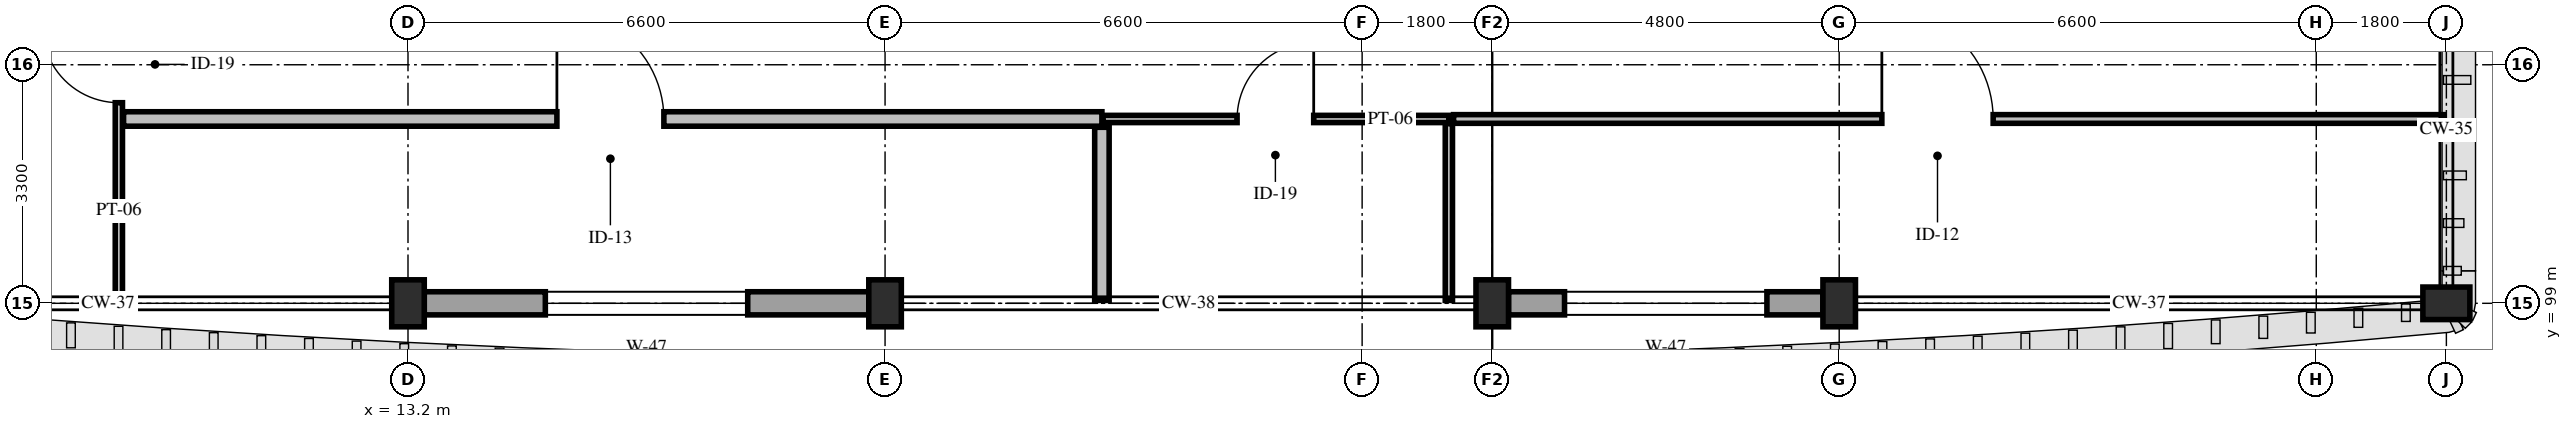
"""IFC4 building model, lengths in metres.
Left out: names, types, materials, properties, quantities, classifications, styles, units other than length and angle.
Written with IfcOpenShell. Run it as: python <this file> out.ifc"""

import sys

from ifc_helpers import new_model, si_unit, direction, frame, frame_2d, origin, origin_2d, place, context, subcontext, project, spatial, rectangle, extrude, element, fill, save


model = new_model("IFC4")
c1 = context("Model", 3, precision=1e-05, world=origin(), true_north=direction((0.0, 1.0)))
c2 = subcontext(c1, "Body", "Model", "MODEL_VIEW")
j1 = project(units=[si_unit("LENGTHUNIT", "METRE"), si_unit("PLANEANGLEUNIT", "RADIAN")], contexts=[c1])
p1 = place(None, origin())
s1 = spatial("IfcSite", under=j1, at=p1, CompositionType="ELEMENT")
p2 = place(p1, origin())
s2 = spatial("IfcBuilding", under=s1, at=p2, CompositionType="ELEMENT")
p3 = place(p2, frame((0.0, 0.0, 42.6)))
s3 = spatial("IfcBuildingStorey", under=s2, at=p3, CompositionType="ELEMENT", Elevation=42.6)
for number, where, z_axis, x_axis in (
    (1, (13.2, 99.0, 0.0), (0.0, 0.0, 1.0), (1.0, 0.0, 0.0)),
    (2, (19.8, 99.0, 0.0), (0.0, 0.0, 1.0), (1.0, 0.0, 0.0)),
    (3, (28.2, 99.0, 0.0), (0.0, 0.0, 1.0), (1.0, 0.0, 0.0)),
    (4, (33.0, 99.0, 0.0), (0.0, 0.0, 1.0), (1.0, 0.0, 0.0)),
    (5, (41.4, 99.0, 0.0), (0.0, 0.0, 1.0), (0.0, 1.0, 0.0)),
):
    element("IfcColumn", number, at=place(p3, frame(where, z_axis=z_axis, x_axis=x_axis)), inside=s3, PredefinedType="PILASTER", context=c2, shape_type="SweptSolid", body=[
        extrude(rectangle(XDim=0.45, YDim=0.65, at=origin_2d()), origin(), (0.0, 0.0, 1.0), 4.2),
    ])
p4 = place(p3, frame((32.775, 99.0, 0.0), z_axis=(0.0, 0.0, 1.0), x_axis=(-1.0, 0.0, 0.0)))
e6 = element("IfcWall", 6, at=p4, inside=s3, PredefinedType="STANDARD", context=c2, shape_type="SweptSolid", body=[
    extrude(rectangle(XDim=4.35, YDim=0.32, at=frame_2d((2.175, 0.0))), origin(), (0.0, 0.0, 1.0), 3.35),
])
p5 = place(p4, frame((0.775, 0.0, 0.85)))
e7 = element("IfcOpeningElement", 7, at=p5, cuts=e6, PredefinedType="OPENING", context=c2, shape_type="SweptSolid", body=[
    extrude(rectangle(XDim=2.8, YDim=2.08, at=frame_2d((1.4, 1.04))), frame((0.0, 0.175, 0.0), z_axis=(0.0, -1.0, 0.0), x_axis=(1.0, 0.0, 0.0)), (0.0, 0.0, 1.0), 0.35),
])
p6 = place(p3, frame((19.575, 99.0, 0.0), z_axis=(0.0, 0.0, 1.0), x_axis=(-1.0, 0.0, 0.0)))
e8 = element("IfcWall", 8, at=p6, inside=s3, PredefinedType="STANDARD", context=c2, shape_type="SweptSolid", body=[
    extrude(rectangle(XDim=6.15, YDim=0.32, at=frame_2d((3.075, 0.0))), origin(), (0.0, 0.0, 1.0), 3.35),
])
p7 = place(p6, frame((1.675, 0.0, 0.85)))
e9 = element("IfcOpeningElement", 9, at=p7, cuts=e8, PredefinedType="OPENING", context=c2, shape_type="SweptSolid", body=[
    extrude(rectangle(XDim=2.8, YDim=2.08, at=frame_2d((1.4, 1.04))), frame((0.0, 0.175, 0.0), z_axis=(0.0, -1.0, 0.0), x_axis=(1.0, 0.0, 0.0)), (0.0, 0.0, 1.0), 0.35),
])
p8 = place(p3, frame((9.2, 99.04, 0.0), z_axis=(0.0, 0.0, 1.0), x_axis=(0.0, 1.0, 0.0)))
e10 = element("IfcWall", 10, at=p8, inside=s3, PredefinedType="PARTITIONING", context=c2, shape_type="SweptSolid", body=[
    extrude(rectangle(XDim=4.045, YDim=0.1, at=frame_2d((2.022, 0.0))), origin(), (0.0, 0.0, 1.0), 3.88),
])
p9 = place(p8, frame((2.735, 0.0, 0.0)))
e11 = element("IfcOpeningElement", 11, at=p9, cuts=e10, PredefinedType="OPENING", context=c2, shape_type="SweptSolid", body=[
    extrude(rectangle(XDim=1.06, YDim=2.2, at=frame_2d((0.53, 1.1))), frame((0.0, 0.065, 0.0), z_axis=(0.0, -1.0, 0.0), x_axis=(1.0, 0.0, 0.0)), (0.0, 0.0, 1.0), 0.13),
])
p10 = place(p3, frame((9.265, 101.55, 0.0), z_axis=(0.0, 0.0, 1.0), x_axis=(1.0, 0.0, 0.0)))
e12 = element("IfcWall", 12, at=p10, inside=s3, PredefinedType="PARTITIONING", context=c2, shape_type="SweptSolid", body=[
    extrude(rectangle(XDim=13.535, YDim=0.2, at=frame_2d((6.768, 0.0))), origin(), (0.0, 0.0, 1.0), 3.88),
])
p11 = place(p10, frame((5.995, 0.0, 0.0)))
e13 = element("IfcOpeningElement", 13, at=p11, cuts=e12, PredefinedType="OPENING", context=c2, shape_type="SweptSolid", body=[
    extrude(rectangle(XDim=1.48, YDim=2.3, at=frame_2d((0.74, 1.15))), frame((0.0, 0.115, 0.0), z_axis=(0.0, -1.0, 0.0), x_axis=(1.0, 0.0, 0.0)), (0.0, 0.0, 1.0), 0.23),
])
p12 = place(p3, frame((22.8, 99.04, 0.0), z_axis=(0.0, 0.0, 1.0), x_axis=(0.0, 1.0, 0.0)))
e14 = element("IfcWall", 14, at=p12, inside=s3, PredefinedType="PARTITIONING", context=c2, shape_type="SweptSolid", body=[
    extrude(rectangle(XDim=2.395, YDim=0.2, at=frame_2d((1.198, 0.0))), origin(), (0.0, 0.0, 1.0), 3.88),
])
p13 = place(p3, frame((22.815, 101.55, 0.0), z_axis=(0.0, 0.0, 1.0), x_axis=(1.0, 0.0, 0.0)))
e15 = element("IfcWall", 15, at=p13, inside=s3, PredefinedType="PARTITIONING", context=c2, shape_type="SweptSolid", body=[
    extrude(rectangle(XDim=4.785, YDim=0.1, at=frame_2d((2.393, 0.0))), origin(), (0.0, 0.0, 1.0), 3.88),
])
p14 = place(p13, frame((1.855, 0.0, 0.0)))
e16 = element("IfcOpeningElement", 16, at=p14, cuts=e15, PredefinedType="OPENING", context=c2, shape_type="SweptSolid", body=[
    extrude(rectangle(XDim=1.06, YDim=2.2, at=frame_2d((0.53, 1.1))), frame((0.0, 0.065, 0.0), z_axis=(0.0, -1.0, 0.0), x_axis=(1.0, 0.0, 0.0)), (0.0, 0.0, 1.0), 0.13),
])
p15 = place(p3, frame((27.6, 99.04, 0.0), z_axis=(0.0, 0.0, 1.0), x_axis=(0.0, 1.0, 0.0)))
e17 = element("IfcWall", 17, at=p15, inside=s3, PredefinedType="PARTITIONING", context=c2, shape_type="SweptSolid", body=[
    extrude(rectangle(XDim=2.445, YDim=0.1, at=frame_2d((1.223, 0.0))), origin(), (0.0, 0.0, 1.0), 3.88),
])
p16 = place(p3, frame((27.665, 101.55, 0.0), z_axis=(0.0, 0.0, 1.0), x_axis=(1.0, 0.0, 0.0)))
e18 = element("IfcWall", 18, at=p16, inside=s3, PredefinedType="PARTITIONING", context=c2, shape_type="SweptSolid", body=[
    extrude(rectangle(XDim=13.695, YDim=0.12, at=frame_2d((6.848, 0.0))), origin(), (0.0, 0.0, 1.0), 3.88),
])
p17 = place(p16, frame((5.925, 0.0, 0.0)))
e19 = element("IfcOpeningElement", 19, at=p17, cuts=e18, PredefinedType="OPENING", context=c2, shape_type="SweptSolid", body=[
    extrude(rectangle(XDim=1.54, YDim=2.25, at=frame_2d((0.77, 1.125))), frame((0.0, 0.075, 0.0), z_axis=(0.0, -1.0, 0.0), x_axis=(1.0, 0.0, 0.0)), (0.0, 0.0, 1.0), 0.15),
])
p18 = place(p5, origin())
e20 = element("IfcWindow", 20, at=p18, inside=s3, PartitioningType="DOUBLE_PANEL_VERTICAL", PredefinedType="WINDOW", context=c2, shape_type="SweptSolid", body=[
    extrude(rectangle(XDim=2.8, YDim=2.08, at=frame_2d((1.4, 1.04))), frame((0.0, 0.03, 0.0), z_axis=(0.0, -1.0, 0.0), x_axis=(1.0, 0.0, 0.0)), (0.0, 0.0, 1.0), 0.06),
])
fill(e7, e20)
p19 = place(p7, origin())
e21 = element("IfcWindow", 21, at=p19, inside=s3, PartitioningType="DOUBLE_PANEL_VERTICAL", PredefinedType="WINDOW", context=c2, shape_type="SweptSolid", body=[
    extrude(rectangle(XDim=2.8, YDim=2.08, at=frame_2d((1.4, 1.04))), frame((0.0, 0.03, 0.0), z_axis=(0.0, -1.0, 0.0), x_axis=(1.0, 0.0, 0.0)), (0.0, 0.0, 1.0), 0.06),
])
fill(e9, e21)
p20 = place(p9, origin())
e22 = element("IfcDoor", 22, at=p20, inside=s3, OperationType="SINGLE_SWING_RIGHT", PredefinedType="DOOR", context=c2, shape_type="SweptSolid", body=[
    extrude(rectangle(XDim=1.06, YDim=2.2, at=frame_2d((0.53, 1.1))), frame((0.0, 0.025, 0.0), z_axis=(0.0, -1.0, 0.0), x_axis=(1.0, 0.0, 0.0)), (0.0, 0.0, 1.0), 0.05),
])
fill(e11, e22)
p21 = place(p11, origin())
e23 = element("IfcDoor", 23, at=p21, inside=s3, OperationType="SINGLE_SWING_LEFT", PredefinedType="DOOR", context=c2, shape_type="SweptSolid", body=[
    extrude(rectangle(XDim=1.48, YDim=2.3, at=frame_2d((0.74, 1.15))), frame((0.0, 0.025, 0.0), z_axis=(0.0, -1.0, 0.0), x_axis=(1.0, 0.0, 0.0)), (0.0, 0.0, 1.0), 0.05),
])
fill(e13, e23)
p22 = place(p14, origin())
e24 = element("IfcDoor", 24, at=p22, inside=s3, OperationType="SINGLE_SWING_RIGHT", PredefinedType="DOOR", context=c2, shape_type="SweptSolid", body=[
    extrude(rectangle(XDim=1.06, YDim=2.2, at=frame_2d((0.53, 1.1))), frame((0.0, 0.025, 0.0), z_axis=(0.0, -1.0, 0.0), x_axis=(1.0, 0.0, 0.0)), (0.0, 0.0, 1.0), 0.05),
])
fill(e16, e24)
p23 = place(p17, origin())
e25 = element("IfcDoor", 25, at=p23, inside=s3, OperationType="SINGLE_SWING_LEFT", PredefinedType="DOOR", context=c2, shape_type="SweptSolid", body=[
    extrude(rectangle(XDim=1.54, YDim=2.25, at=frame_2d((0.77, 1.125))), frame((0.0, 0.025, 0.0), z_axis=(0.0, -1.0, 0.0), x_axis=(1.0, 0.0, 0.0)), (0.0, 0.0, 1.0), 0.05),
])
fill(e19, e25)
save(model, sys.argv[1])
